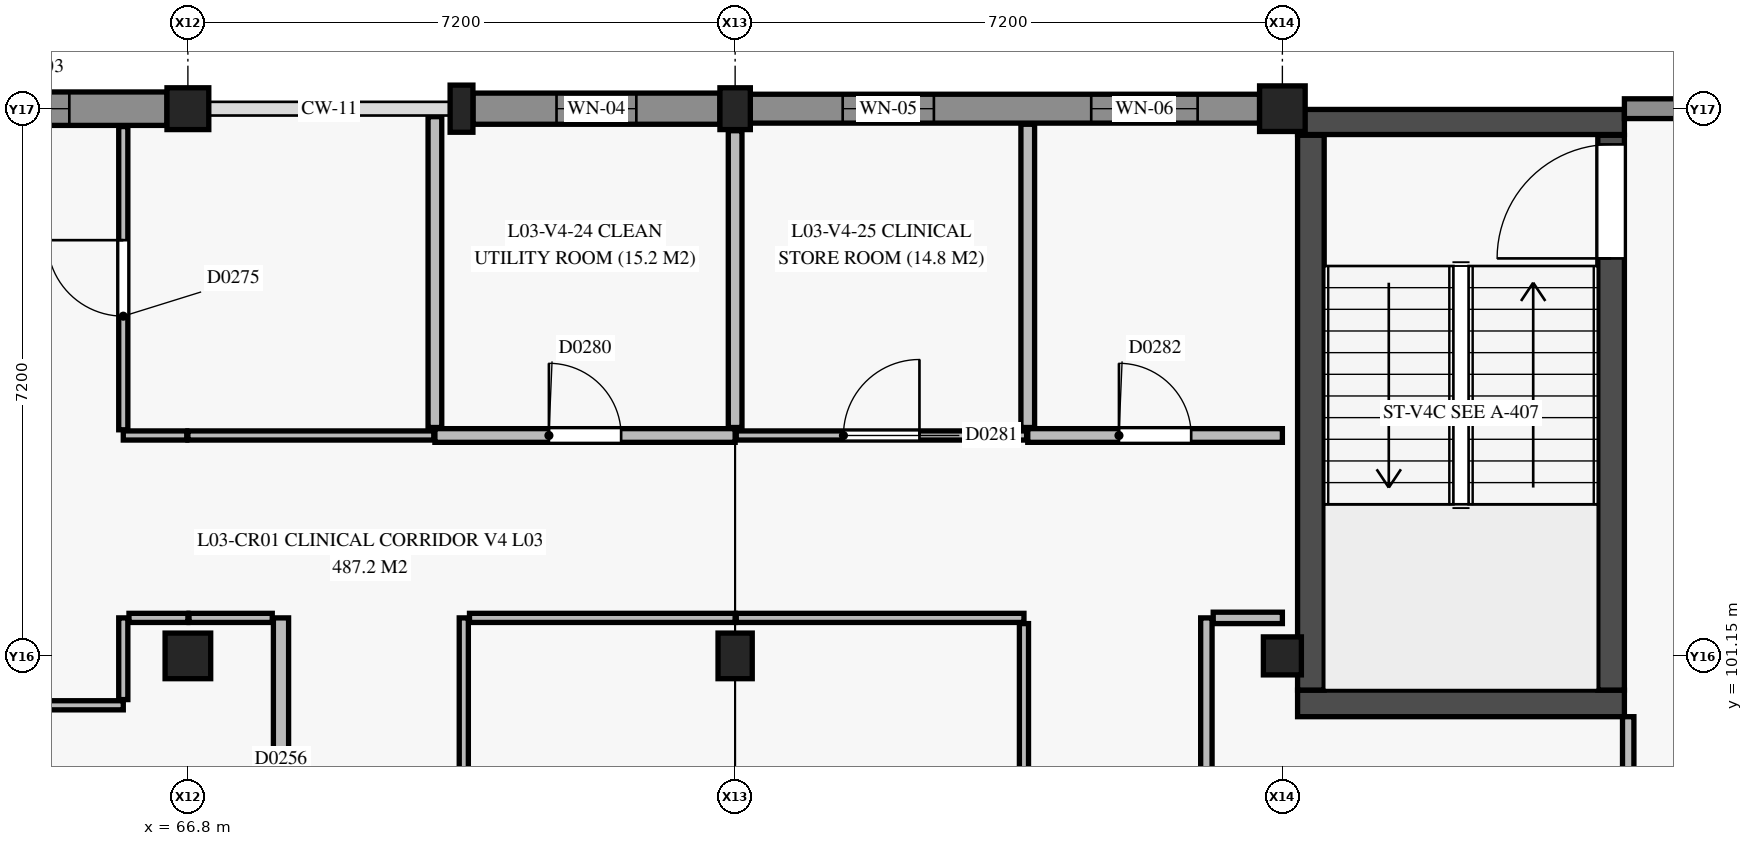
"""IFC4 building model, lengths in metres.
Left out: names, types, materials, properties, quantities, classifications, styles, units other than length and angle.
Written with IfcOpenShell. Run it as: python <this file> out.ifc"""

import sys

from ifc_helpers import new_model, si_unit, direction, frame, frame_2d, origin, origin_2d, place, context, subcontext, project, spatial, rectangle, circle, extrude, element, fill, save


model = new_model("IFC4")
c1 = context("Model", 3, precision=1e-05, world=origin(), true_north=direction((0.0, 1.0)))
c2 = subcontext(c1, "Body", "Model", "MODEL_VIEW")
j1 = project(units=[si_unit("LENGTHUNIT", "METRE"), si_unit("PLANEANGLEUNIT", "RADIAN")], contexts=[c1])
p1 = place(None, origin())
s1 = spatial("IfcSite", under=j1, at=p1, CompositionType="ELEMENT")
p2 = place(p1, origin())
s2 = spatial("IfcBuilding", under=s1, at=p2, CompositionType="ELEMENT")
p3 = place(p2, frame((0.0, 0.0, 13.2)))
s3 = spatial("IfcBuildingStorey", under=s2, at=p3, CompositionType="ELEMENT", Elevation=13.2)
p4 = place(p3, frame((66.8, 101.15, 0.0), z_axis=(0.0, 0.0, 1.0), x_axis=(1.0, 0.0, 0.0)))
e1 = element("IfcColumn", 1, at=p4, inside=s3, PredefinedType="COLUMN", context=c2, shape_type="SweptSolid", body=[
    extrude(rectangle(XDim=0.6, YDim=0.6, at=origin_2d()), origin(), (0.0, 0.0, 1.0), 4.2),
])
p5 = place(p3, frame((66.8, 108.35, 0.0), z_axis=(0.0, 0.0, 1.0), x_axis=(1.0, 0.0, 0.0)))
e2 = element("IfcColumn", 2, at=p5, inside=s3, PredefinedType="COLUMN", context=c2, shape_type="SweptSolid", body=[
    extrude(rectangle(XDim=0.55, YDim=0.55, at=origin_2d()), origin(), (0.0, 0.0, 1.0), 4.2),
])
p6 = place(p3, frame((74.0, 101.15, 0.0), z_axis=(0.0, 0.0, 1.0), x_axis=(1.0, 0.0, 0.0)))
e3 = element("IfcColumn", 3, at=p6, inside=s3, PredefinedType="COLUMN", context=c2, shape_type="SweptSolid", body=[
    extrude(rectangle(XDim=0.45, YDim=0.6, at=origin_2d()), origin(), (0.0, 0.0, 1.0), 4.2),
])
p7 = place(p3, frame((74.0, 108.35, 0.0), z_axis=(0.0, 0.0, 1.0), x_axis=(1.0, 0.0, 0.0)))
e4 = element("IfcColumn", 4, at=p7, inside=s3, PredefinedType="COLUMN", context=c2, shape_type="SweptSolid", body=[
    extrude(rectangle(XDim=0.4, YDim=0.55, at=origin_2d()), origin(), (0.0, 0.0, 1.0), 4.2),
])
p8 = place(p3, frame((81.2, 101.15, 0.0), z_axis=(0.0, 0.0, 1.0), x_axis=(1.0, 0.0, 0.0)))
e5 = element("IfcColumn", 5, at=p8, inside=s3, PredefinedType="COLUMN", context=c2, shape_type="SweptSolid", body=[
    extrude(rectangle(XDim=0.5, YDim=0.5, at=origin_2d()), origin(), (0.0, 0.0, 1.0), 4.2),
])
p9 = place(p3, frame((81.2, 108.35, 0.0), z_axis=(0.0, 0.0, 1.0), x_axis=(1.0, 0.0, 0.0)))
e6 = element("IfcColumn", 6, at=p9, inside=s3, PredefinedType="COLUMN", context=c2, shape_type="SweptSolid", body=[
    extrude(circle(Radius=0.3, at=origin_2d()), origin(), (0.0, 0.0, 1.0), 4.2),
])
p10 = place(p3, frame((70.4, 108.35, 0.0), z_axis=(0.0, 0.0, 1.0), x_axis=(1.0, 0.0, 0.0)))
e7 = element("IfcColumn", 7, at=p10, inside=s3, PredefinedType="PILASTER", context=c2, shape_type="SweptSolid", body=[
    extrude(rectangle(XDim=0.3, YDim=0.62, at=origin_2d()), origin(), (0.0, 0.0, 1.0), 4.2),
])
p11 = place(p3, frame((81.4, 100.525, 0.0), z_axis=(0.0, 0.0, 1.0), x_axis=(1.0, 0.0, 0.0)))
e8 = element("IfcWall", 8, at=p11, inside=s3, PredefinedType="SHEAR", context=c2, shape_type="SweptSolid", body=[
    extrude(rectangle(XDim=4.3, YDim=0.35, at=frame_2d((2.15, 0.0))), origin(), (0.0, 0.0, 1.0), 3.95),
])
p12 = place(p3, frame((81.4, 108.175, 0.0), z_axis=(0.0, 0.0, 1.0), x_axis=(1.0, 0.0, 0.0)))
e9 = element("IfcWall", 9, at=p12, inside=s3, PredefinedType="SHEAR", context=c2, shape_type="SweptSolid", body=[
    extrude(rectangle(XDim=4.3, YDim=0.33, at=frame_2d((2.15, 0.0))), origin(), (0.0, 0.0, 1.0), 3.95),
])
p13 = place(p3, frame((81.575, 100.7, 0.0), z_axis=(0.0, 0.0, 1.0), x_axis=(0.0, 1.0, 0.0)))
e10 = element("IfcWall", 10, at=p13, inside=s3, PredefinedType="SHEAR", context=c2, shape_type="SweptSolid", body=[
    extrude(rectangle(XDim=7.3, YDim=0.35, at=frame_2d((3.65, 0.0))), origin(), (0.0, 0.0, 1.0), 3.95),
])
p14 = place(p3, frame((85.525, 100.7, 0.0), z_axis=(0.0, 0.0, 1.0), x_axis=(0.0, 1.0, 0.0)))
e11 = element("IfcWall", 11, at=p14, inside=s3, PredefinedType="SHEAR", context=c2, shape_type="SweptSolid", body=[
    extrude(rectangle(XDim=7.3, YDim=0.35, at=frame_2d((3.65, 0.0))), origin(), (0.0, 0.0, 1.0), 3.95),
])
p15 = place(p14, frame((5.68, 0.0, 0.0)))
e12 = element("IfcOpeningElement", 12, at=p15, cuts=e11, PredefinedType="OPENING", context=c2, shape_type="SweptSolid", body=[
    extrude(rectangle(XDim=1.5, YDim=2.15, at=frame_2d((0.75, 1.075))), frame((0.0, 0.185, 0.0), z_axis=(0.0, -1.0, 0.0), x_axis=(1.0, 0.0, 0.0)), (0.0, 0.0, 1.0), 0.37),
])
p16 = place(p3, frame((63.65, 108.35, 0.0), z_axis=(0.0, 0.0, 1.0), x_axis=(1.0, 0.0, 0.0)))
e13 = element("IfcWall", 13, at=p16, inside=s3, PredefinedType="USERDEFINED", context=c2, shape_type="SweptSolid", body=[
    extrude(rectangle(XDim=2.875, YDim=0.44, at=frame_2d((1.438, 0.0))), origin(), (0.0, 0.0, 1.0), 3.13),
])
p17 = place(p16, frame((0.69, 0.0, 0.9)))
e14 = element("IfcOpeningElement", 14, at=p17, cuts=e13, PredefinedType="OPENING", context=c2, shape_type="SweptSolid", body=[
    extrude(rectangle(XDim=0.9, YDim=1.8, at=frame_2d((0.45, 0.9))), frame((0.0, 0.23, 0.0), z_axis=(0.0, -1.0, 0.0), x_axis=(1.0, 0.0, 0.0)), (0.0, 0.0, 1.0), 0.46),
])
p18 = place(p3, frame((70.55, 108.35, 0.0), z_axis=(0.0, 0.0, 1.0), x_axis=(1.0, 0.0, 0.0)))
e15 = element("IfcWall", 15, at=p18, inside=s3, PredefinedType="USERDEFINED", context=c2, shape_type="SweptSolid", body=[
    extrude(rectangle(XDim=3.25, YDim=0.41, at=frame_2d((1.625, 0.0))), origin(), (0.0, 0.0, 1.0), 3.13),
])
p19 = place(p18, frame((1.1, 0.0, 0.9)))
e16 = element("IfcOpeningElement", 16, at=p19, cuts=e15, PredefinedType="OPENING", context=c2, shape_type="SweptSolid", body=[
    extrude(rectangle(XDim=1.05, YDim=1.8, at=frame_2d((0.525, 0.9))), frame((0.0, 0.215, 0.0), z_axis=(0.0, -1.0, 0.0), x_axis=(1.0, 0.0, 0.0)), (0.0, 0.0, 1.0), 0.43),
])
p20 = place(p3, frame((74.2, 108.35, 0.0), z_axis=(0.0, 0.0, 1.0), x_axis=(1.0, 0.0, 0.0)))
e17 = element("IfcWall", 17, at=p20, inside=s3, PredefinedType="USERDEFINED", context=c2, shape_type="SweptSolid", body=[
    extrude(rectangle(XDim=6.7, YDim=0.38, at=frame_2d((3.35, 0.0))), origin(), (0.0, 0.0, 1.0), 3.13),
])
p21 = place(p20, frame((1.215, 0.0, 0.9)))
e18 = element("IfcOpeningElement", 18, at=p21, cuts=e17, PredefinedType="OPENING", context=c2, shape_type="SweptSolid", body=[
    extrude(rectangle(XDim=1.2, YDim=1.8, at=frame_2d((0.6, 0.9))), frame((0.0, 0.2, 0.0), z_axis=(0.0, -1.0, 0.0), x_axis=(1.0, 0.0, 0.0)), (0.0, 0.0, 1.0), 0.4),
])
p22 = place(p20, frame((4.485, 0.0, 0.9)))
e19 = element("IfcOpeningElement", 19, at=p22, cuts=e17, PredefinedType="OPENING", context=c2, shape_type="SweptSolid", body=[
    extrude(rectangle(XDim=1.4, YDim=1.8, at=frame_2d((0.7, 0.9))), frame((0.0, 0.2, 0.0), z_axis=(0.0, -1.0, 0.0), x_axis=(1.0, 0.0, 0.0)), (0.0, 0.0, 1.0), 0.4),
])
p23 = place(p3, frame((85.7, 108.35, 0.0), z_axis=(0.0, 0.0, 1.0), x_axis=(1.0, 0.0, 0.0)))
e20 = element("IfcWall", 20, at=p23, inside=s3, PredefinedType="SOLIDWALL", context=c2, shape_type="SweptSolid", body=[
    extrude(rectangle(XDim=2.35, YDim=0.26, at=frame_2d((1.175, 0.0))), origin(), (0.0, 0.0, 1.0), 3.13),
])
p24 = place(p23, frame((0.725, 0.0, 0.95)))
e21 = element("IfcOpeningElement", 21, at=p24, cuts=e20, PredefinedType="OPENING", context=c2, shape_type="SweptSolid", body=[
    extrude(rectangle(XDim=0.9, YDim=1.2, at=frame_2d((0.45, 0.6))), frame((0.0, 0.14, 0.0), z_axis=(0.0, -1.0, 0.0), x_axis=(1.0, 0.0, 0.0)), (0.0, 0.0, 1.0), 0.28),
])
p25 = place(p3, frame((68.025, 95.85, 0.0), z_axis=(0.0, 0.0, 1.0), x_axis=(0.0, 1.0, 0.0)))
e22 = element("IfcWall", 22, at=p25, inside=s3, PredefinedType="PARTITIONING", context=c2, shape_type="SweptSolid", body=[
    extrude(rectangle(XDim=5.8, YDim=0.2, at=frame_2d((2.9, 0.0))), origin(), (0.0, 0.0, 1.0), 3.415),
])
p26 = place(p25, frame((1.496, 0.0, 0.0)))
e23 = element("IfcOpeningElement", 23, at=p26, cuts=e22, PredefinedType="OPENING", context=c2, shape_type="SweptSolid", body=[
    extrude(rectangle(XDim=1.4, YDim=2.2, at=frame_2d((0.7, 1.1))), frame((0.0, 0.11, 0.0), z_axis=(0.0, -1.0, 0.0), x_axis=(1.0, 0.0, 0.0)), (0.0, 0.0, 1.0), 0.22),
])
p27 = place(p3, frame((70.05, 104.05, 0.0), z_axis=(0.0, 0.0, 1.0), x_axis=(1.0, 0.0, 0.0)))
e24 = element("IfcWall", 24, at=p27, inside=s3, PredefinedType="PLUMBINGWALL", context=c2, shape_type="SweptSolid", body=[
    extrude(rectangle(XDim=3.95, YDim=0.18, at=frame_2d((1.975, 0.0))), origin(), (0.0, 0.0, 1.0), 3.455),
])
p28 = place(p27, frame((1.5, 0.0, 0.0)))
e25 = element("IfcOpeningElement", 25, at=p28, cuts=e24, PredefinedType="OPENING", context=c2, shape_type="SweptSolid", body=[
    extrude(rectangle(XDim=0.95, YDim=2.1, at=frame_2d((0.475, 1.05))), frame((0.0, 0.1, 0.0), z_axis=(0.0, -1.0, 0.0), x_axis=(1.0, 0.0, 0.0)), (0.0, 0.0, 1.0), 0.2),
])
p29 = place(p3, frame((77.85, 104.05, 0.0), z_axis=(0.0, 0.0, 1.0), x_axis=(1.0, 0.0, 0.0)))
e26 = element("IfcWall", 26, at=p29, inside=s3, PredefinedType="PLUMBINGWALL", context=c2, shape_type="SweptSolid", body=[
    extrude(rectangle(XDim=3.35, YDim=0.18, at=frame_2d((1.675, 0.0))), origin(), (0.0, 0.0, 1.0), 3.355),
])
p30 = place(p29, frame((1.2, 0.0, 0.0)))
e27 = element("IfcOpeningElement", 27, at=p30, cuts=e26, PredefinedType="OPENING", context=c2, shape_type="SweptSolid", body=[
    extrude(rectangle(XDim=0.95, YDim=2.1, at=frame_2d((0.475, 1.05))), frame((0.0, 0.1, 0.0), z_axis=(0.0, -1.0, 0.0), x_axis=(1.0, 0.0, 0.0)), (0.0, 0.0, 1.0), 0.2),
])
p31 = place(p3, frame((85.75, 91.55, 0.0), z_axis=(0.0, 0.0, 1.0), x_axis=(0.0, 1.0, 0.0)))
e28 = element("IfcWall", 28, at=p31, inside=s3, PredefinedType="PARTITIONING", context=c2, shape_type="SweptSolid", body=[
    extrude(rectangle(XDim=8.8, YDim=0.15, at=frame_2d((4.4, 0.0))), origin(), (0.0, 0.0, 1.0), 3.285),
])
p32 = place(p3, frame((80.2, 91.64, 0.0), z_axis=(0.0, 0.0, 1.0), x_axis=(0.0, 1.0, 0.0)))
e29 = element("IfcWall", 29, at=p32, inside=s3, PredefinedType="PARTITIONING", context=c2, shape_type="SweptSolid", body=[
    extrude(rectangle(XDim=10.01, YDim=0.15, at=frame_2d((5.005, 0.0))), origin(), (0.0, 0.0, 1.0), 3.285),
])
p33 = place(p32, frame((4.38, 0.0, 0.0)))
e30 = element("IfcOpeningElement", 30, at=p33, cuts=e29, PredefinedType="OPENING", context=c2, shape_type="SweptSolid", body=[
    extrude(rectangle(XDim=1.25, YDim=2.15, at=frame_2d((0.625, 1.075))), frame((0.0, 0.085, 0.0), z_axis=(0.0, -1.0, 0.0), x_axis=(1.0, 0.0, 0.0)), (0.0, 0.0, 1.0), 0.17),
])
p34 = place(p3, frame((80.29, 101.65, 0.0), z_axis=(0.0, 0.0, 1.0), x_axis=(1.0, 0.0, 0.0)))
e31 = element("IfcWall", 31, at=p34, inside=s3, PredefinedType="PARTITIONING", context=c2, shape_type="SweptSolid", body=[
    extrude(rectangle(XDim=0.91, YDim=0.15, at=frame_2d((0.455, 0.0))), origin(), (0.0, 0.0, 1.0), 3.355),
])
p35 = place(p3, frame((70.43, 94.4, 0.0), z_axis=(0.0, 0.0, 1.0), x_axis=(0.0, 1.0, 0.0)))
e32 = element("IfcWall", 32, at=p35, inside=s3, PredefinedType="PARTITIONING", context=c2, shape_type="SweptSolid", body=[
    extrude(rectangle(XDim=7.25, YDim=0.12, at=frame_2d((3.625, 0.0))), origin(), (0.0, 0.0, 1.0), 3.415),
])
p36 = place(p35, frame((3.05, 0.0, 0.0)))
e33 = element("IfcOpeningElement", 33, at=p36, cuts=e32, PredefinedType="OPENING", context=c2, shape_type="SweptSolid", body=[
    extrude(rectangle(XDim=1.15, YDim=2.15, at=frame_2d((0.575, 1.075))), frame((0.0, 0.07, 0.0), z_axis=(0.0, -1.0, 0.0), x_axis=(1.0, 0.0, 0.0)), (0.0, 0.0, 1.0), 0.14),
])
p37 = place(p3, frame((70.505, 101.65, 0.0), z_axis=(0.0, 0.0, 1.0), x_axis=(1.0, 0.0, 0.0)))
e34 = element("IfcWall", 34, at=p37, inside=s3, PredefinedType="PARTITIONING", context=c2, shape_type="SweptSolid", body=[
    extrude(rectangle(XDim=3.495, YDim=0.12, at=frame_2d((1.748, 0.0))), origin(), (0.0, 0.0, 1.0), 3.455),
])
p38 = place(p3, frame((74.015, 101.65, 0.0), z_axis=(0.0, 0.0, 1.0), x_axis=(1.0, 0.0, 0.0)))
e35 = element("IfcWall", 35, at=p38, inside=s3, PredefinedType="PARTITIONING", context=c2, shape_type="SweptSolid", body=[
    extrude(rectangle(XDim=3.785, YDim=0.12, at=frame_2d((1.893, 0.0))), origin(), (0.0, 0.0, 1.0), 3.455),
])
p39 = place(p3, frame((77.8, 99.4, 0.0), z_axis=(0.0, 0.0, 1.0), x_axis=(0.0, 1.0, 0.0)))
e36 = element("IfcWall", 36, at=p39, inside=s3, PredefinedType="PARTITIONING", context=c2, shape_type="SweptSolid", body=[
    extrude(rectangle(XDim=2.175, YDim=0.12, at=frame_2d((1.087, 0.0))), origin(), (0.0, 0.0, 1.0), 3.455),
])
p40 = place(p3, frame((66.8, 104.05, 0.0), z_axis=(0.0, 0.0, 1.0), x_axis=(1.0, 0.0, 0.0)))
e37 = element("IfcWall", 37, at=p40, inside=s3, PredefinedType="PARTITIONING", context=c2, shape_type="SweptSolid", body=[
    extrude(rectangle(XDim=3.235, YDim=0.12, at=frame_2d((1.617, 0.0))), origin(), (0.0, 0.0, 1.0), 3.355),
])
p41 = place(p3, frame((65.95, 104.05, 0.0), z_axis=(0.0, 0.0, 1.0), x_axis=(1.0, 0.0, 0.0)))
e38 = element("IfcWall", 38, at=p41, inside=s3, PredefinedType="PARTITIONING", context=c2, shape_type="SweptSolid", body=[
    extrude(rectangle(XDim=0.835, YDim=0.12, at=frame_2d((0.417, 0.0))), origin(), (0.0, 0.0, 1.0), 3.355),
])
p42 = place(p3, frame((65.95, 104.125, 0.0), z_axis=(0.0, 0.0, 1.0), x_axis=(0.0, 1.0, 0.0)))
e39 = element("IfcWall", 39, at=p42, inside=s3, PredefinedType="PARTITIONING", context=c2, shape_type="SweptSolid", body=[
    extrude(rectangle(XDim=3.99, YDim=0.12, at=frame_2d((1.995, 0.0))), origin(), (0.0, 0.0, 1.0), 3.95),
])
p43 = place(p42, frame((1.495, 0.0, 0.0)))
e40 = element("IfcOpeningElement", 40, at=p43, cuts=e39, PredefinedType="OPENING", context=c2, shape_type="SweptSolid", body=[
    extrude(rectangle(XDim=1.0, YDim=2.15, at=frame_2d((0.5, 1.075))), frame((0.0, 0.07, 0.0), z_axis=(0.0, -1.0, 0.0), x_axis=(1.0, 0.0, 0.0)), (0.0, 0.0, 1.0), 0.14),
])
p44 = place(p3, frame((63.665, 100.5, 0.0), z_axis=(0.0, 0.0, 1.0), x_axis=(1.0, 0.0, 0.0)))
e41 = element("IfcWall", 41, at=p44, inside=s3, PredefinedType="PARTITIONING", context=c2, shape_type="SweptSolid", body=[
    extrude(rectangle(XDim=2.285, YDim=0.12, at=frame_2d((1.143, 0.0))), origin(), (0.0, 0.0, 1.0), 3.95),
])
p45 = place(p3, frame((65.95, 100.575, 0.0), z_axis=(0.0, 0.0, 1.0), x_axis=(0.0, 1.0, 0.0)))
e42 = element("IfcWall", 42, at=p45, inside=s3, PredefinedType="PARTITIONING", context=c2, shape_type="SweptSolid", body=[
    extrude(rectangle(XDim=1.075, YDim=0.12, at=frame_2d((0.538, 0.0))), origin(), (0.0, 0.0, 1.0), 3.95),
])
p46 = place(p3, frame((66.025, 101.65, 0.0), z_axis=(0.0, 0.0, 1.0), x_axis=(1.0, 0.0, 0.0)))
e43 = element("IfcWall", 43, at=p46, inside=s3, PredefinedType="PARTITIONING", context=c2, shape_type="SweptSolid", body=[
    extrude(rectangle(XDim=0.775, YDim=0.12, at=frame_2d((0.388, 0.0))), origin(), (0.0, 0.0, 1.0), 3.355),
])
p47 = place(p3, frame((66.815, 101.65, 0.0), z_axis=(0.0, 0.0, 1.0), x_axis=(1.0, 0.0, 0.0)))
e44 = element("IfcWall", 44, at=p47, inside=s3, PredefinedType="PARTITIONING", context=c2, shape_type="SweptSolid", body=[
    extrude(rectangle(XDim=1.095, YDim=0.12, at=frame_2d((0.547, 0.0))), origin(), (0.0, 0.0, 1.0), 3.355),
])
p48 = place(p3, frame((74.015, 104.05, 0.0), z_axis=(0.0, 0.0, 1.0), x_axis=(1.0, 0.0, 0.0)))
e45 = element("IfcWall", 45, at=p48, inside=s3, PredefinedType="PARTITIONING", context=c2, shape_type="SweptSolid", body=[
    extrude(rectangle(XDim=3.82, YDim=0.12, at=frame_2d((1.91, 0.0))), origin(), (0.0, 0.0, 1.0), 3.455),
])
p49 = place(p48, frame((1.41, 0.0, 0.0)))
e46 = element("IfcOpeningElement", 46, at=p49, cuts=e45, PredefinedType="OPENING", context=c2, shape_type="SweptSolid", body=[
    extrude(rectangle(XDim=1.0, YDim=2.15, at=frame_2d((0.5, 1.075))), frame((0.0, 0.07, 0.0), z_axis=(0.0, -1.0, 0.0), x_axis=(1.0, 0.0, 0.0)), (0.0, 0.0, 1.0), 0.14),
])
p50 = place(p3, frame((70.05, 104.155, 0.0), z_axis=(0.0, 0.0, 1.0), x_axis=(0.0, 1.0, 0.0)))
e47 = element("IfcWall", 47, at=p50, inside=s3, PredefinedType="PLUMBINGWALL", context=c2, shape_type="SweptSolid", body=[
    extrude(rectangle(XDim=4.09, YDim=0.18, at=frame_2d((2.045, 0.0))), origin(), (0.0, 0.0, 1.0), 3.515),
])
p51 = place(p3, frame((74.0, 104.155, 0.0), z_axis=(0.0, 0.0, 1.0), x_axis=(0.0, 1.0, 0.0)))
e48 = element("IfcWall", 48, at=p51, inside=s3, PredefinedType="PLUMBINGWALL", context=c2, shape_type="SweptSolid", body=[
    extrude(rectangle(XDim=3.905, YDim=0.18, at=frame_2d((1.953, 0.0))), origin(), (0.0, 0.0, 1.0), 3.455),
])
p52 = place(p3, frame((77.85, 104.155, 0.0), z_axis=(0.0, 0.0, 1.0), x_axis=(0.0, 1.0, 0.0)))
e49 = element("IfcWall", 49, at=p52, inside=s3, PredefinedType="PLUMBINGWALL", context=c2, shape_type="SweptSolid", body=[
    extrude(rectangle(XDim=3.99, YDim=0.18, at=frame_2d((1.995, 0.0))), origin(), (0.0, 0.0, 1.0), 3.475),
])
p53 = place(p17, origin())
e50 = element("IfcWindow", 50, at=p53, inside=s3, PartitioningType="SINGLE_PANEL", PredefinedType="WINDOW", context=c2, shape_type="SweptSolid", body=[
    extrude(rectangle(XDim=0.9, YDim=1.8, at=frame_2d((0.45, 0.9))), frame((0.0, 0.03, 0.0), z_axis=(0.0, -1.0, 0.0), x_axis=(1.0, 0.0, 0.0)), (0.0, 0.0, 1.0), 0.06),
])
fill(e14, e50)
p54 = place(p19, origin())
e51 = element("IfcWindow", 51, at=p54, inside=s3, PartitioningType="SINGLE_PANEL", PredefinedType="WINDOW", context=c2, shape_type="SweptSolid", body=[
    extrude(rectangle(XDim=1.05, YDim=1.8, at=frame_2d((0.525, 0.9))), frame((0.0, 0.03, 0.0), z_axis=(0.0, -1.0, 0.0), x_axis=(1.0, 0.0, 0.0)), (0.0, 0.0, 1.0), 0.06),
])
fill(e16, e51)
p55 = place(p21, origin())
e52 = element("IfcWindow", 52, at=p55, inside=s3, PartitioningType="SINGLE_PANEL", PredefinedType="WINDOW", context=c2, shape_type="SweptSolid", body=[
    extrude(rectangle(XDim=1.2, YDim=1.8, at=frame_2d((0.6, 0.9))), frame((0.0, 0.03, 0.0), z_axis=(0.0, -1.0, 0.0), x_axis=(1.0, 0.0, 0.0)), (0.0, 0.0, 1.0), 0.06),
])
fill(e18, e52)
p56 = place(p22, origin())
e53 = element("IfcWindow", 53, at=p56, inside=s3, PartitioningType="SINGLE_PANEL", PredefinedType="WINDOW", context=c2, shape_type="SweptSolid", body=[
    extrude(rectangle(XDim=1.4, YDim=1.8, at=frame_2d((0.7, 0.9))), frame((0.0, 0.03, 0.0), z_axis=(0.0, -1.0, 0.0), x_axis=(1.0, 0.0, 0.0)), (0.0, 0.0, 1.0), 0.06),
])
fill(e19, e53)
p57 = place(p15, origin())
e54 = element("IfcDoor", 54, at=p57, inside=s3, OperationType="SINGLE_SWING_LEFT", PredefinedType="DOOR", context=c2, shape_type="SweptSolid", body=[
    extrude(rectangle(XDim=1.5, YDim=2.15, at=frame_2d((0.75, 1.075))), frame((0.0, 0.025, 0.0), z_axis=(0.0, -1.0, 0.0), x_axis=(1.0, 0.0, 0.0)), (0.0, 0.0, 1.0), 0.05),
])
fill(e12, e54)
p58 = place(p43, origin())
e55 = element("IfcDoor", 55, at=p58, inside=s3, OperationType="SINGLE_SWING_RIGHT", PredefinedType="DOOR", context=c2, shape_type="SweptSolid", body=[
    extrude(rectangle(XDim=1.0, YDim=2.15, at=frame_2d((0.5, 1.075))), frame((0.0, 0.025, 0.0), z_axis=(0.0, -1.0, 0.0), x_axis=(1.0, 0.0, 0.0)), (0.0, 0.0, 1.0), 0.05),
])
fill(e40, e55)
p59 = place(p28, origin())
e56 = element("IfcDoor", 56, at=p59, inside=s3, OperationType="SINGLE_SWING_LEFT", PredefinedType="DOOR", context=c2, shape_type="SweptSolid", body=[
    extrude(rectangle(XDim=0.95, YDim=2.1, at=frame_2d((0.475, 1.05))), frame((0.0, 0.025, 0.0), z_axis=(0.0, -1.0, 0.0), x_axis=(1.0, 0.0, 0.0)), (0.0, 0.0, 1.0), 0.05),
])
fill(e25, e56)
p60 = place(p49, origin())
e57 = element("IfcDoor", 57, at=p60, inside=s3, OperationType="SINGLE_SWING_RIGHT", PredefinedType="DOOR", context=c2, shape_type="SweptSolid", body=[
    extrude(rectangle(XDim=1.0, YDim=2.15, at=frame_2d((0.5, 1.075))), frame((0.0, 0.025, 0.0), z_axis=(0.0, -1.0, 0.0), x_axis=(1.0, 0.0, 0.0)), (0.0, 0.0, 1.0), 0.05),
])
fill(e46, e57)
p61 = place(p30, origin())
e58 = element("IfcDoor", 58, at=p61, inside=s3, OperationType="SINGLE_SWING_LEFT", PredefinedType="DOOR", context=c2, shape_type="SweptSolid", body=[
    extrude(rectangle(XDim=0.95, YDim=2.1, at=frame_2d((0.475, 1.05))), frame((0.0, 0.025, 0.0), z_axis=(0.0, -1.0, 0.0), x_axis=(1.0, 0.0, 0.0)), (0.0, 0.0, 1.0), 0.05),
])
fill(e27, e58)
save(model, sys.argv[1])
